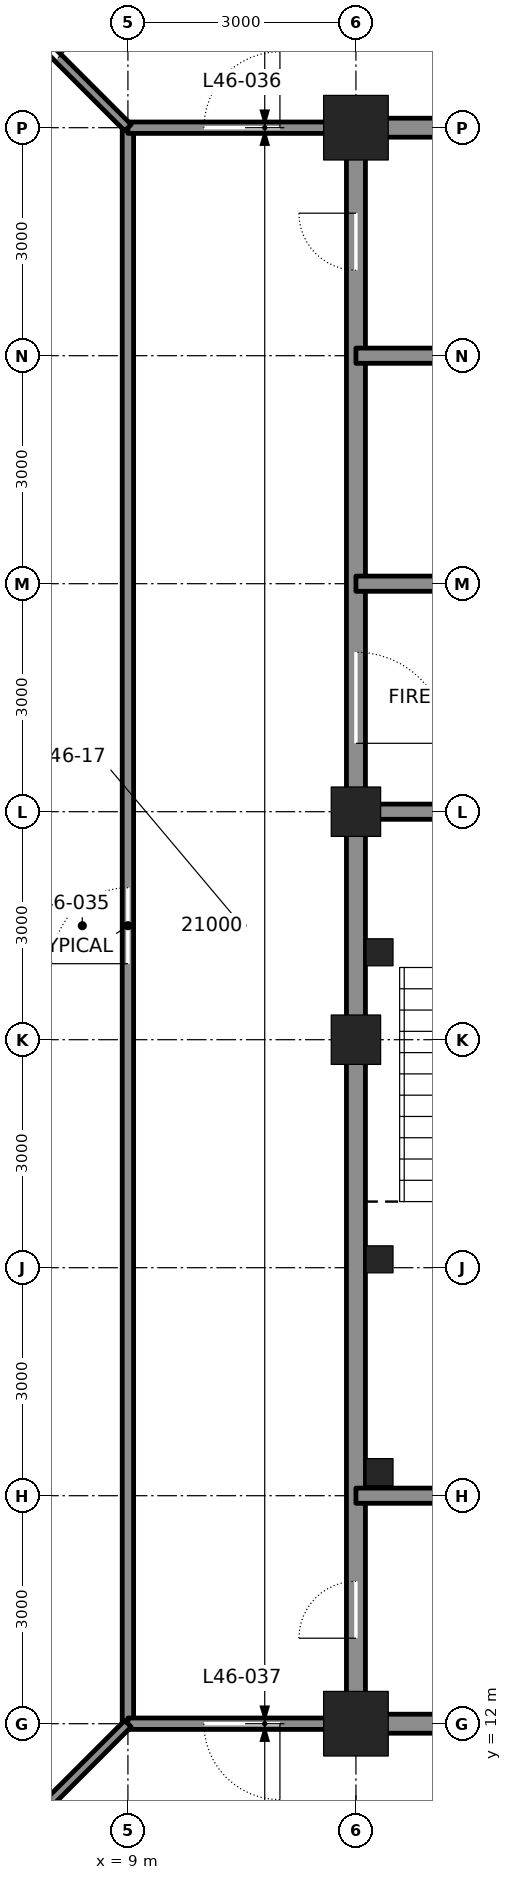
"""IFC4 building model, lengths in metres.
Left out: names, types, materials, properties, quantities, classifications, styles, units other than length and angle.
Written with IfcOpenShell. Run it as: python <this file> out.ifc"""

import sys

from ifc_helpers import new_model, si_unit, direction, frame, frame_2d, origin, origin_2d, place, context, subcontext, project, spatial, rectangle, hollow_rectangle, extrude, element, fill, save


model = new_model("IFC4")
c1 = context("Model", 3, precision=1e-05, world=origin(), true_north=direction((0.0, 1.0)))
c2 = subcontext(c1, "Body", "Model", "MODEL_VIEW")
j1 = project(units=[si_unit("LENGTHUNIT", "METRE"), si_unit("PLANEANGLEUNIT", "RADIAN")], contexts=[c1])
p1 = place(None, origin())
s1 = spatial("IfcSite", under=j1, at=p1, CompositionType="ELEMENT")
p2 = place(p1, origin())
s2 = spatial("IfcBuilding", under=s1, at=p2, CompositionType="ELEMENT")
p3 = place(p2, frame((0.0, 0.0, 209.7)))
s3 = spatial("IfcBuildingStorey", under=s2, at=p3, CompositionType="ELEMENT", Elevation=209.7)
for number, where, z_axis, x_axis in (
    (1, (12.0, 12.0, 0.0), (0.0, 0.0, 1.0), (1.0, 0.0, 0.0)),
    (2, (12.0, 33.0, 0.0), (0.0, 0.0, 1.0), (1.0, 0.0, 0.0)),
):
    element("IfcColumn", number, at=place(p3, frame(where, z_axis=z_axis, x_axis=x_axis)), inside=s3, PredefinedType="COLUMN", context=c2, shape_type="SweptSolid", body=[
        extrude(hollow_rectangle(XDim=0.85, YDim=0.85, WallThickness=0.085, at=origin_2d()), origin(), (0.0, 0.0, 1.0), 4.2),
    ])
for number, where, z_axis, x_axis in (
    (3, (12.0, 21.0, 0.0), (0.0, 0.0, 1.0), (1.0, 0.0, 0.0)),
    (4, (12.0, 24.0, 0.0), (0.0, 0.0, 1.0), (1.0, 0.0, 0.0)),
):
    element("IfcColumn", number, at=place(p3, frame(where, z_axis=z_axis, x_axis=x_axis)), inside=s3, PredefinedType="COLUMN", context=c2, shape_type="SweptSolid", body=[
        extrude(hollow_rectangle(XDim=0.65, YDim=0.65, WallThickness=0.065, at=origin_2d()), origin(), (0.0, 0.0, 1.0), 4.2),
    ])
p4 = place(p3, frame((12.0, 12.25, 0.0), z_axis=(0.0, 0.0, 1.0), x_axis=(0.0, 1.0, 0.0)))
e5 = element("IfcWall", 5, at=p4, inside=s3, PredefinedType="SOLIDWALL", context=c2, shape_type="SweptSolid", body=[
    extrude(rectangle(XDim=8.5, YDim=0.25, at=frame_2d((4.25, 0.0))), origin(), (0.0, 0.0, 1.0), 3.113),
])
p5 = place(p4, frame((0.875, 0.0, 0.0)))
e6 = element("IfcOpeningElement", 6, at=p5, cuts=e5, PredefinedType="OPENING", context=c2, shape_type="SweptSolid", body=[
    extrude(rectangle(XDim=0.75, YDim=2.1, at=frame_2d((0.375, 1.05))), frame((0.0, 0.135, 0.0), z_axis=(0.0, -1.0, 0.0), x_axis=(1.0, 0.0, 0.0)), (0.0, 0.0, 1.0), 0.27),
])
p6 = place(p3, frame((12.0, 21.25, 0.0), z_axis=(0.0, 0.0, 1.0), x_axis=(0.0, 1.0, 0.0)))
e7 = element("IfcWall", 7, at=p6, inside=s3, PredefinedType="SOLIDWALL", context=c2, shape_type="SweptSolid", body=[
    extrude(rectangle(XDim=2.5, YDim=0.25, at=frame_2d((1.25, 0.0))), origin(), (0.0, 0.0, 1.0), 3.113),
])
p7 = place(p3, frame((12.0, 24.25, 0.0), z_axis=(0.0, 0.0, 1.0), x_axis=(0.0, 1.0, 0.0)))
e8 = element("IfcWall", 8, at=p7, inside=s3, PredefinedType="SOLIDWALL", context=c2, shape_type="SweptSolid", body=[
    extrude(rectangle(XDim=8.5, YDim=0.25, at=frame_2d((4.25, 0.0))), origin(), (0.0, 0.0, 1.0), 3.113),
])
p8 = place(p7, frame((0.65, 0.0, 0.0)))
e9 = element("IfcOpeningElement", 9, at=p8, cuts=e8, PredefinedType="OPENING", context=c2, shape_type="SweptSolid", body=[
    extrude(rectangle(XDim=1.2, YDim=2.1, at=frame_2d((0.6, 1.05))), frame((0.0, 0.135, 0.0), z_axis=(0.0, -1.0, 0.0), x_axis=(1.0, 0.0, 0.0)), (0.0, 0.0, 1.0), 0.27),
])
p9 = place(p7, frame((6.875, 0.0, 0.0)))
e10 = element("IfcOpeningElement", 10, at=p9, cuts=e8, PredefinedType="OPENING", context=c2, shape_type="SweptSolid", body=[
    extrude(rectangle(XDim=0.75, YDim=2.1, at=frame_2d((0.375, 1.05))), frame((0.0, 0.135, 0.0), z_axis=(0.0, -1.0, 0.0), x_axis=(1.0, 0.0, 0.0)), (0.0, 0.0, 1.0), 0.27),
])
p10 = place(p3, frame((12.25, 12.0, 0.0), z_axis=(0.0, 0.0, 1.0), x_axis=(1.0, 0.0, 0.0)))
e11 = element("IfcWall", 11, at=p10, inside=s3, PredefinedType="SOLIDWALL", context=c2, shape_type="SweptSolid", body=[
    extrude(rectangle(XDim=4.0, YDim=0.25, at=frame_2d((2.0, 0.0))), origin(), (0.0, 0.0, 1.0), 3.182),
])
p11 = place(p3, frame((12.0, 15.0, 0.0), z_axis=(0.0, 0.0, 1.0), x_axis=(1.0, 0.0, 0.0)))
e12 = element("IfcWall", 12, at=p11, inside=s3, PredefinedType="SOLIDWALL", context=c2, shape_type="SweptSolid", body=[
    extrude(rectangle(XDim=7.5, YDim=0.2, at=frame_2d((3.75, 0.0))), origin(), (0.0, 0.0, 1.0), 4.04),
])
p12 = place(p3, frame((12.25, 24.0, 0.0), z_axis=(0.0, 0.0, 1.0), x_axis=(1.0, 0.0, 0.0)))
e13 = element("IfcWall", 13, at=p12, inside=s3, PredefinedType="SOLIDWALL", context=c2, shape_type="SweptSolid", body=[
    extrude(rectangle(XDim=4.0, YDim=0.2, at=frame_2d((2.0, 0.0))), origin(), (0.0, 0.0, 1.0), 3.09),
])
p13 = place(p12, frame((1.4, 0.0, 0.0)))
e14 = element("IfcOpeningElement", 14, at=p13, cuts=e13, PredefinedType="OPENING", context=c2, shape_type="SweptSolid", body=[
    extrude(rectangle(XDim=1.2, YDim=2.1, at=frame_2d((0.6, 1.05))), frame((0.0, 0.11, 0.0), z_axis=(0.0, -1.0, 0.0), x_axis=(1.0, 0.0, 0.0)), (0.0, 0.0, 1.0), 0.22),
])
p14 = place(p3, frame((12.0, 27.0, 0.0), z_axis=(0.0, 0.0, 1.0), x_axis=(1.0, 0.0, 0.0)))
e15 = element("IfcWall", 15, at=p14, inside=s3, PredefinedType="SOLIDWALL", context=c2, shape_type="SweptSolid", body=[
    extrude(rectangle(XDim=7.5, YDim=0.2, at=frame_2d((3.75, 0.0))), origin(), (0.0, 0.0, 1.0), 4.04),
])
p15 = place(p14, frame((1.65, 0.0, 0.0)))
e16 = element("IfcOpeningElement", 16, at=p15, cuts=e15, PredefinedType="OPENING", context=c2, shape_type="SweptSolid", body=[
    extrude(rectangle(XDim=1.2, YDim=2.1, at=frame_2d((0.6, 1.05))), frame((0.0, 0.11, 0.0), z_axis=(0.0, -1.0, 0.0), x_axis=(1.0, 0.0, 0.0)), (0.0, 0.0, 1.0), 0.22),
])
p16 = place(p3, frame((12.0, 30.0, 0.0), z_axis=(0.0, 0.0, 1.0), x_axis=(1.0, 0.0, 0.0)))
e17 = element("IfcWall", 17, at=p16, inside=s3, PredefinedType="SOLIDWALL", context=c2, shape_type="SweptSolid", body=[
    extrude(rectangle(XDim=4.5, YDim=0.2, at=frame_2d((2.25, 0.0))), origin(), (0.0, 0.0, 1.0), 4.04),
])
p17 = place(p3, frame((12.25, 33.0, 0.0), z_axis=(0.0, 0.0, 1.0), x_axis=(1.0, 0.0, 0.0)))
e18 = element("IfcWall", 18, at=p17, inside=s3, PredefinedType="SOLIDWALL", context=c2, shape_type="SweptSolid", body=[
    extrude(rectangle(XDim=4.0, YDim=0.25, at=frame_2d((2.0, 0.0))), origin(), (0.0, 0.0, 1.0), 3.182),
])
p18 = place(p3, frame((9.0, 12.0, 0.0), z_axis=(0.0, 0.0, 1.0), x_axis=(0.0, 1.0, 0.0)))
e19 = element("IfcWall", 19, at=p18, inside=s3, PredefinedType="PARTITIONING", context=c2, shape_type="SweptSolid", body=[
    extrude(rectangle(XDim=21.0, YDim=0.15, at=frame_2d((10.5, 0.0))), origin(), (0.0, 0.0, 1.0), 4.04),
])
p19 = place(p18, frame((10.0, 0.0, 0.0)))
e20 = element("IfcOpeningElement", 20, at=p19, cuts=e19, PredefinedType="OPENING", context=c2, shape_type="SweptSolid", body=[
    extrude(rectangle(XDim=1.0, YDim=2.4, at=frame_2d((0.5, 1.2))), frame((0.0, 0.085, 0.0), z_axis=(0.0, -1.0, 0.0), x_axis=(1.0, 0.0, 0.0)), (0.0, 0.0, 1.0), 0.17),
])
p20 = place(p3, frame((9.0, 33.0, 0.0), z_axis=(0.0, 0.0, 1.0), x_axis=(1.0, 0.0, 0.0)))
e21 = element("IfcWall", 21, at=p20, inside=s3, PredefinedType="PARTITIONING", context=c2, shape_type="SweptSolid", body=[
    extrude(rectangle(XDim=3.0, YDim=0.15, at=frame_2d((1.5, 0.0))), origin(), (0.0, 0.0, 1.0), 3.271),
])
p21 = place(p20, frame((1.0, 0.0, 0.0)))
e22 = element("IfcOpeningElement", 22, at=p21, cuts=e21, PredefinedType="OPENING", context=c2, shape_type="SweptSolid", body=[
    extrude(rectangle(XDim=1.0, YDim=2.4, at=frame_2d((0.5, 1.2))), frame((0.0, 0.085, 0.0), z_axis=(0.0, -1.0, 0.0), x_axis=(1.0, 0.0, 0.0)), (0.0, 0.0, 1.0), 0.17),
])
p22 = place(p3, frame((9.0, 12.0, 0.0), z_axis=(0.0, 0.0, 1.0), x_axis=(1.0, 0.0, 0.0)))
e23 = element("IfcWall", 23, at=p22, inside=s3, PredefinedType="PARTITIONING", context=c2, shape_type="SweptSolid", body=[
    extrude(rectangle(XDim=3.0, YDim=0.15, at=frame_2d((1.5, 0.0))), origin(), (0.0, 0.0, 1.0), 3.271),
])
p23 = place(p22, frame((1.0, 0.0, 0.0)))
e24 = element("IfcOpeningElement", 24, at=p23, cuts=e23, PredefinedType="OPENING", context=c2, shape_type="SweptSolid", body=[
    extrude(rectangle(XDim=1.0, YDim=2.4, at=frame_2d((0.5, 1.2))), frame((0.0, 0.085, 0.0), z_axis=(0.0, -1.0, 0.0), x_axis=(1.0, 0.0, 0.0)), (0.0, 0.0, 1.0), 0.17),
])
p24 = place(p3, frame((9.0, 33.0, 0.0), z_axis=(0.0, 0.0, 1.0), x_axis=(-0.707106781187, 0.707106781187, 0.0)))
e25 = element("IfcWall", 25, at=p24, inside=s3, PredefinedType="PARTITIONING", context=c2, shape_type="SweptSolid", body=[
    extrude(rectangle(XDim=5.732, YDim=0.12, at=frame_2d((2.866, 0.0))), origin(), (0.0, 0.0, 1.0), 4.04),
])
p25 = place(p24, frame((1.3, 0.0, 0.0)))
e26 = element("IfcOpeningElement", 26, at=p25, cuts=e25, PredefinedType="OPENING", context=c2, shape_type="SweptSolid", body=[
    extrude(rectangle(XDim=1.0, YDim=2.4, at=frame_2d((0.5, 1.2))), frame((0.0, 0.07, 0.0), z_axis=(0.0, -1.0, 0.0), x_axis=(1.0, 0.0, 0.0)), (0.0, 0.0, 1.0), 0.14),
])
p26 = place(p3, frame((9.0, 12.0, 0.0), z_axis=(0.0, 0.0, 1.0), x_axis=(-0.707106781187, -0.707106781187, 0.0)))
e27 = element("IfcWall", 27, at=p26, inside=s3, PredefinedType="PARTITIONING", context=c2, shape_type="SweptSolid", body=[
    extrude(rectangle(XDim=1.489, YDim=0.12, at=frame_2d((0.745, 0.0))), origin(), (0.0, 0.0, 1.0), 4.04),
])
for number, where, z_axis, x_axis in (
    (28, (12.31, 15.31, 0.0), (0.0, 0.0, 1.0), (1.0, 0.0, 0.0)),
    (29, (12.31, 18.11, 0.0), (0.0, 0.0, 1.0), (1.0, 0.0, 0.0)),
    (30, (12.31, 22.15, 0.0), (0.0, 0.0, 1.0), (1.0, 0.0, 0.0)),
):
    element("IfcColumn", number, at=place(p3, frame(where, z_axis=z_axis, x_axis=x_axis)), inside=s3, PredefinedType="COLUMN", context=c2, shape_type="SweptSolid", body=[
        extrude(hollow_rectangle(XDim=0.356, YDim=0.356, WallThickness=0.009, at=origin_2d()), origin(), (0.0, 0.0, 1.0), 4.2),
    ])
p27 = place(p8, frame((1.2, 0.0, 0.0), z_axis=(0.0, 0.0, 1.0), x_axis=(-1.0, 0.0, 0.0)))
e31 = element("IfcDoor", 31, at=p27, inside=s3, OperationType="SINGLE_SWING_RIGHT", PredefinedType="DOOR", context=c2, shape_type="SweptSolid", body=[
    extrude(rectangle(XDim=1.2, YDim=2.1, at=frame_2d((0.6, 1.05))), frame((0.0, 0.025, 0.0), z_axis=(0.0, -1.0, 0.0), x_axis=(1.0, 0.0, 0.0)), (0.0, 0.0, 1.0), 0.05),
])
fill(e9, e31)
p28 = place(p5, origin())
e32 = element("IfcDoor", 32, at=p28, inside=s3, OperationType="SINGLE_SWING_LEFT", PredefinedType="DOOR", context=c2, shape_type="SweptSolid", body=[
    extrude(rectangle(XDim=0.75, YDim=2.1, at=frame_2d((0.375, 1.05))), frame((0.0, 0.025, 0.0), z_axis=(0.0, -1.0, 0.0), x_axis=(1.0, 0.0, 0.0)), (0.0, 0.0, 1.0), 0.05),
])
fill(e6, e32)
p29 = place(p9, origin())
e33 = element("IfcDoor", 33, at=p29, inside=s3, OperationType="SINGLE_SWING_RIGHT", PredefinedType="DOOR", context=c2, shape_type="SweptSolid", body=[
    extrude(rectangle(XDim=0.75, YDim=2.1, at=frame_2d((0.375, 1.05))), frame((0.0, 0.025, 0.0), z_axis=(0.0, -1.0, 0.0), x_axis=(1.0, 0.0, 0.0)), (0.0, 0.0, 1.0), 0.05),
])
fill(e10, e33)
p30 = place(p19, origin())
e34 = element("IfcDoor", 34, at=p30, inside=s3, OperationType="SINGLE_SWING_LEFT", PredefinedType="DOOR", context=c2, shape_type="SweptSolid", body=[
    extrude(rectangle(XDim=1.0, YDim=2.4, at=frame_2d((0.5, 1.2))), frame((0.0, 0.025, 0.0), z_axis=(0.0, -1.0, 0.0), x_axis=(1.0, 0.0, 0.0)), (0.0, 0.0, 1.0), 0.05),
])
fill(e20, e34)
p31 = place(p21, origin())
e35 = element("IfcDoor", 35, at=p31, inside=s3, OperationType="SINGLE_SWING_RIGHT", PredefinedType="DOOR", context=c2, shape_type="SweptSolid", body=[
    extrude(rectangle(XDim=1.0, YDim=2.4, at=frame_2d((0.5, 1.2))), frame((0.0, 0.025, 0.0), z_axis=(0.0, -1.0, 0.0), x_axis=(1.0, 0.0, 0.0)), (0.0, 0.0, 1.0), 0.05),
])
fill(e22, e35)
p32 = place(p23, frame((1.0, 0.0, 0.0), z_axis=(0.0, 0.0, 1.0), x_axis=(-1.0, 0.0, 0.0)))
e36 = element("IfcDoor", 36, at=p32, inside=s3, OperationType="SINGLE_SWING_LEFT", PredefinedType="DOOR", context=c2, shape_type="SweptSolid", body=[
    extrude(rectangle(XDim=1.0, YDim=2.4, at=frame_2d((0.5, 1.2))), frame((0.0, 0.025, 0.0), z_axis=(0.0, -1.0, 0.0), x_axis=(1.0, 0.0, 0.0)), (0.0, 0.0, 1.0), 0.05),
])
fill(e24, e36)
p33 = place(p25, frame((1.0, 0.0, 0.0), z_axis=(0.0, 0.0, 1.0), x_axis=(-1.0, 0.0, 0.0)))
e37 = element("IfcDoor", 37, at=p33, inside=s3, OperationType="SINGLE_SWING_RIGHT", PredefinedType="DOOR", context=c2, shape_type="SweptSolid", body=[
    extrude(rectangle(XDim=1.0, YDim=2.4, at=frame_2d((0.5, 1.2))), frame((0.0, 0.025, 0.0), z_axis=(0.0, -1.0, 0.0), x_axis=(1.0, 0.0, 0.0)), (0.0, 0.0, 1.0), 0.05),
])
fill(e26, e37)
save(model, sys.argv[1])
